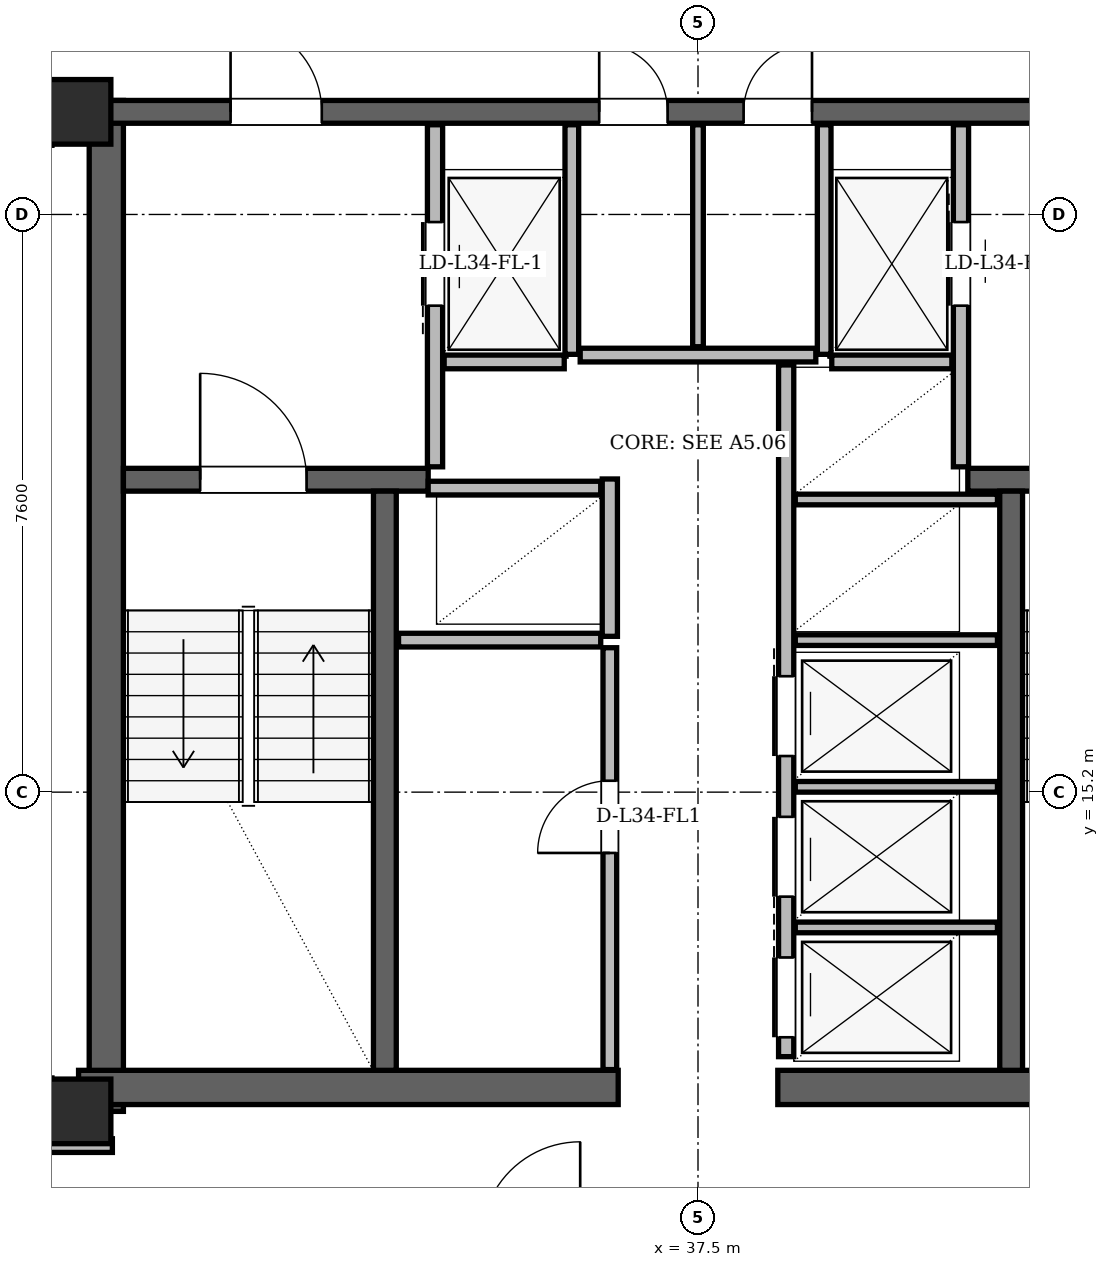
"""IFC4 building model, lengths in metres.
Left out: names, types, materials, properties, quantities, classifications, styles, units other than length and angle.
Written with IfcOpenShell. Run it as: python <this file> out.ifc"""

import sys

from ifc_helpers import new_model, si_unit, direction, frame, frame_2d, origin, origin_2d, place, context, subcontext, project, spatial, rectangle, hollow_rectangle, extrude, element, fill, save


model = new_model("IFC4")
c1 = context("Model", 3, precision=1e-05, world=origin(), true_north=direction((0.0, 1.0)))
c2 = subcontext(c1, "Body", "Model", "MODEL_VIEW")
j1 = project(units=[si_unit("LENGTHUNIT", "METRE"), si_unit("PLANEANGLEUNIT", "RADIAN")], contexts=[c1])
p1 = place(None, origin())
s1 = spatial("IfcSite", under=j1, at=p1, CompositionType="ELEMENT")
p2 = place(p1, origin())
s2 = spatial("IfcBuilding", under=s1, at=p2, CompositionType="ELEMENT")
p3 = place(p2, frame((0.0, 0.0, 130.2)))
s3 = spatial("IfcBuildingStorey", under=s2, at=p3, CompositionType="ELEMENT", Elevation=130.2)
for number, where, z_axis, x_axis in (
    (1, (29.35, 11.0, 0.0), (0.0, 0.0, 1.0), (1.0, 0.0, 0.0)),
    (2, (29.35, 24.15, 0.0), (0.0, 0.0, 1.0), (1.0, 0.0, 0.0)),
):
    element("IfcColumn", number, at=place(p3, frame(where, z_axis=z_axis, x_axis=x_axis)), inside=s3, PredefinedType="COLUMN", context=c2, shape_type="SweptSolid", body=[
        extrude(hollow_rectangle(XDim=0.85, YDim=0.85, WallThickness=0.07, at=origin_2d()), origin(), (0.0, 0.0, 1.0), 3.6),
    ])
p4 = place(p3, frame((29.715, 11.0, 0.0), z_axis=(0.0, 0.0, 1.0), x_axis=(0.0, 1.0, 0.0)))
e3 = element("IfcWall", 3, at=p4, inside=s3, PredefinedType="SHEAR", context=c2, shape_type="SweptSolid", body=[
    extrude(rectangle(XDim=13.3, YDim=0.45, at=frame_2d((6.65, 0.0))), origin(), (0.0, 0.0, 1.0), 3.34),
])
for number, where, z_axis, x_axis in (
    (4, (29.35, 11.315, 0.0), (0.0, 0.0, 1.0), (1.0, 0.0, 0.0)),
    (5, (38.55, 11.315, 0.0), (0.0, 0.0, 1.0), (1.0, 0.0, 0.0)),
):
    element("IfcWall", number, at=place(p3, frame(where, z_axis=z_axis, x_axis=x_axis)), inside=s3, PredefinedType="SHEAR", context=c2, shape_type="SweptSolid", body=[
        extrude(rectangle(XDim=7.1, YDim=0.45, at=frame_2d((3.55, 0.0))), origin(), (0.0, 0.0, 1.0), 3.34),
    ])
p5 = place(p3, frame((29.65, 24.15, 0.0), z_axis=(0.0, 0.0, 1.0), x_axis=(1.0, 0.0, 0.0)))
e6 = element("IfcWall", 6, at=p5, inside=s3, PredefinedType="SHEAR", context=c2, shape_type="SweptSolid", body=[
    extrude(rectangle(XDim=15.7, YDim=0.3, at=frame_2d((7.85, 0.0))), origin(), (0.0, 0.0, 1.0), 3.34),
])
p6 = place(p5, frame((1.7, 0.0, 0.0)))
e7 = element("IfcOpeningElement", 7, at=p6, cuts=e6, PredefinedType="OPENING", context=c2, shape_type="SweptSolid", body=[
    extrude(rectangle(XDim=1.2, YDim=2.2, at=frame_2d((0.6, 1.1))), frame((0.0, 0.15, 0.0), z_axis=(0.0, -1.0, 0.0), x_axis=(1.0, 0.0, 0.0)), (0.0, 0.0, 1.0), 0.3),
])
p7 = place(p5, frame((12.8, 0.0, 0.0)))
e8 = element("IfcOpeningElement", 8, at=p7, cuts=e6, PredefinedType="OPENING", context=c2, shape_type="SweptSolid", body=[
    extrude(rectangle(XDim=1.2, YDim=2.2, at=frame_2d((0.6, 1.1))), frame((0.0, 0.15, 0.0), z_axis=(0.0, -1.0, 0.0), x_axis=(1.0, 0.0, 0.0)), (0.0, 0.0, 1.0), 0.3),
])
p8 = place(p5, frame((6.55, 0.0, 0.0)))
e9 = element("IfcOpeningElement", 9, at=p8, cuts=e6, PredefinedType="OPENING", context=c2, shape_type="SweptSolid", body=[
    extrude(rectangle(XDim=0.9, YDim=2.05, at=frame_2d((0.45, 1.025))), frame((0.0, 0.15, 0.0), z_axis=(0.0, -1.0, 0.0), x_axis=(1.0, 0.0, 0.0)), (0.0, 0.0, 1.0), 0.3),
])
p9 = place(p5, frame((8.45, 0.0, 0.0)))
e10 = element("IfcOpeningElement", 10, at=p9, cuts=e6, PredefinedType="OPENING", context=c2, shape_type="SweptSolid", body=[
    extrude(rectangle(XDim=0.9, YDim=2.05, at=frame_2d((0.45, 1.025))), frame((0.0, 0.15, 0.0), z_axis=(0.0, -1.0, 0.0), x_axis=(1.0, 0.0, 0.0)), (0.0, 0.0, 1.0), 0.3),
])
p10 = place(p3, frame((29.94, 19.31, 0.0), z_axis=(0.0, 0.0, 1.0), x_axis=(1.0, 0.0, 0.0)))
e11 = element("IfcWall", 11, at=p10, inside=s3, PredefinedType="SHEAR", context=c2, shape_type="SweptSolid", body=[
    extrude(rectangle(XDim=4.01, YDim=0.3, at=frame_2d((2.005, 0.0))), origin(), (0.0, 0.0, 1.0), 3.34),
])
p11 = place(p10, frame((1.01, 0.0, 0.0)))
e12 = element("IfcOpeningElement", 12, at=p11, cuts=e11, PredefinedType="OPENING", context=c2, shape_type="SweptSolid", body=[
    extrude(rectangle(XDim=1.4, YDim=2.2, at=frame_2d((0.7, 1.1))), frame((0.0, 0.15, 0.0), z_axis=(0.0, -1.0, 0.0), x_axis=(1.0, 0.0, 0.0)), (0.0, 0.0, 1.0), 0.3),
])
p12 = place(p3, frame((41.05, 19.31, 0.0), z_axis=(0.0, 0.0, 1.0), x_axis=(1.0, 0.0, 0.0)))
e13 = element("IfcWall", 13, at=p12, inside=s3, PredefinedType="SHEAR", context=c2, shape_type="SweptSolid", body=[
    extrude(rectangle(XDim=4.01, YDim=0.3, at=frame_2d((2.005, 0.0))), origin(), (0.0, 0.0, 1.0), 3.34),
])
p13 = place(p12, frame((1.6, 0.0, 0.0)))
e14 = element("IfcOpeningElement", 14, at=p13, cuts=e13, PredefinedType="OPENING", context=c2, shape_type="SweptSolid", body=[
    extrude(rectangle(XDim=1.4, YDim=2.2, at=frame_2d((0.7, 1.1))), frame((0.0, 0.15, 0.0), z_axis=(0.0, -1.0, 0.0), x_axis=(1.0, 0.0, 0.0)), (0.0, 0.0, 1.0), 0.3),
])
for number, where, z_axis, x_axis in (
    (15, (33.38, 11.54, 0.0), (0.0, 0.0, 1.0), (0.0, 1.0, 0.0)),
    (16, (41.62, 11.54, 0.0), (0.0, 0.0, 1.0), (0.0, 1.0, 0.0)),
):
    element("IfcWall", number, at=place(p3, frame(where, z_axis=z_axis, x_axis=x_axis)), inside=s3, PredefinedType="SHEAR", context=c2, shape_type="SweptSolid", body=[
        extrude(rectangle(XDim=7.62, YDim=0.3, at=frame_2d((3.81, 0.0))), origin(), (0.0, 0.0, 1.0), 3.34),
    ])
p14 = place(p3, frame((32.303, 43.378, 0.0), z_axis=(0.0, 0.0, 1.0), x_axis=(-0.499999044439, -0.866025955477, 0.0)))
e17 = element("IfcWall", 17, at=p14, inside=s3, PredefinedType="SOLIDWALL", context=c2, shape_type="SweptSolid", body=[
    extrude(rectangle(XDim=35.122, YDim=0.34, at=frame_2d((17.561, 0.0))), origin(), (0.0, 0.0, 1.0), 2.558),
])
p15 = place(p14, frame((8.034, 0.0, 0.0)))
e18 = element("IfcOpeningElement", 18, at=p15, cuts=e17, PredefinedType="OPENING", context=c2, shape_type="SweptSolid", body=[
    extrude(rectangle(XDim=1.5, YDim=2.2, at=frame_2d((0.75, 1.1))), frame((0.0, 0.17, 0.0), z_axis=(0.0, -1.0, 0.0), x_axis=(1.0, 0.0, 0.0)), (0.0, 0.0, 1.0), 0.34),
])
p16 = place(p14, frame((26.832, 0.0, 0.0)))
e19 = element("IfcOpeningElement", 19, at=p16, cuts=e17, PredefinedType="OPENING", context=c2, shape_type="SweptSolid", body=[
    extrude(rectangle(XDim=1.5, YDim=2.2, at=frame_2d((0.75, 1.1))), frame((0.0, 0.17, 0.0), z_axis=(0.0, -1.0, 0.0), x_axis=(1.0, 0.0, 0.0)), (0.0, 0.0, 1.0), 0.34),
])
p17 = place(p14, frame((32.666, 0.0, 0.85)))
e20 = element("IfcOpeningElement", 20, at=p17, cuts=e17, PredefinedType="OPENING", context=c2, shape_type="SweptSolid", body=[
    extrude(rectangle(XDim=1.4, YDim=1.598, at=frame_2d((0.7, 0.799))), frame((0.0, 0.17, 0.0), z_axis=(0.0, -1.0, 0.0), x_axis=(1.0, 0.0, 0.0)), (0.0, 0.0, 1.0), 0.34),
])
p18 = place(p14, frame((22.593, 0.0, 0.85)))
e21 = element("IfcOpeningElement", 21, at=p18, cuts=e17, PredefinedType="OPENING", context=c2, shape_type="SweptSolid", body=[
    extrude(rectangle(XDim=1.2, YDim=1.48, at=frame_2d((0.6, 0.74))), frame((0.0, 0.17, 0.0), z_axis=(0.0, -1.0, 0.0), x_axis=(1.0, 0.0, 0.0)), (0.0, 0.0, 1.0), 0.34),
])
p19 = place(p14, frame((2.413, 0.0, 0.85)))
e22 = element("IfcOpeningElement", 22, at=p19, cuts=e17, PredefinedType="OPENING", context=c2, shape_type="SweptSolid", body=[
    extrude(rectangle(XDim=1.4, YDim=1.598, at=frame_2d((0.7, 0.799))), frame((0.0, 0.17, 0.0), z_axis=(0.0, -1.0, 0.0), x_axis=(1.0, 0.0, 0.0)), (0.0, 0.0, 1.0), 0.34),
])
p20 = place(p14, frame((13.476, 0.0, 0.85)))
e23 = element("IfcOpeningElement", 23, at=p20, cuts=e17, PredefinedType="OPENING", context=c2, shape_type="SweptSolid", body=[
    extrude(rectangle(XDim=2.5, YDim=1.598, at=frame_2d((1.25, 0.799))), frame((0.0, 0.17, 0.0), z_axis=(0.0, -1.0, 0.0), x_axis=(1.0, 0.0, 0.0)), (0.0, 0.0, 1.0), 0.34),
])
p21 = place(p14, frame((18.259, 0.0, 0.85)))
e24 = element("IfcOpeningElement", 24, at=p21, cuts=e17, PredefinedType="OPENING", context=c2, shape_type="SweptSolid", body=[
    extrude(rectangle(XDim=1.2, YDim=1.48, at=frame_2d((0.6, 0.74))), frame((0.0, 0.17, 0.0), z_axis=(0.0, -1.0, 0.0), x_axis=(1.0, 0.0, 0.0)), (0.0, 0.0, 1.0), 0.34),
])
p22 = place(p14, frame((20.455, 0.0, 0.85)))
e25 = element("IfcOpeningElement", 25, at=p22, cuts=e17, PredefinedType="OPENING", context=c2, shape_type="SweptSolid", body=[
    extrude(rectangle(XDim=1.2, YDim=1.48, at=frame_2d((0.6, 0.74))), frame((0.0, 0.17, 0.0), z_axis=(0.0, -1.0, 0.0), x_axis=(1.0, 0.0, 0.0)), (0.0, 0.0, 1.0), 0.34),
])
p23 = place(p3, frame((34.04, 19.48, 0.0), z_axis=(0.0, 0.0, 1.0), x_axis=(0.0, 1.0, 0.0)))
e26 = element("IfcWall", 26, at=p23, inside=s3, PredefinedType="PARTITIONING", context=c2, shape_type="SweptSolid", body=[
    extrude(rectangle(XDim=4.5, YDim=0.2, at=frame_2d((2.25, 0.0))), origin(), (0.0, 0.0, 1.0), 2.38),
])
p24 = place(p23, frame((2.12, 0.0, 0.0)))
e27 = element("IfcOpeningElement", 27, at=p24, cuts=e26, PredefinedType="OPENING", context=c2, shape_type="SweptSolid", body=[
    extrude(rectangle(XDim=1.1, YDim=2.2, at=frame_2d((0.55, 1.1))), frame((0.0, 0.1, 0.0), z_axis=(0.0, -1.0, 0.0), x_axis=(1.0, 0.0, 0.0)), (0.0, 0.0, 1.0), 0.2),
])
p25 = place(p3, frame((35.84, 20.96, 0.0), z_axis=(0.0, 0.0, 1.0), x_axis=(0.0, 1.0, 0.0)))
e28 = element("IfcWall", 28, at=p25, inside=s3, PredefinedType="PARTITIONING", context=c2, shape_type="SweptSolid", body=[
    extrude(rectangle(XDim=3.02, YDim=0.18, at=frame_2d((1.51, 0.0))), origin(), (0.0, 0.0, 1.0), 2.38),
])
p26 = place(p3, frame((34.16, 20.86, 0.0), z_axis=(0.0, 0.0, 1.0), x_axis=(1.0, 0.0, 0.0)))
e29 = element("IfcWall", 29, at=p26, inside=s3, PredefinedType="PARTITIONING", context=c2, shape_type="SweptSolid", body=[
    extrude(rectangle(XDim=1.58, YDim=0.18, at=frame_2d((0.79, 0.0))), origin(), (0.0, 0.0, 1.0), 3.34),
])
p27 = place(p3, frame((40.96, 19.48, 0.0), z_axis=(0.0, 0.0, 1.0), x_axis=(0.0, 1.0, 0.0)))
e30 = element("IfcWall", 30, at=p27, inside=s3, PredefinedType="PARTITIONING", context=c2, shape_type="SweptSolid", body=[
    extrude(rectangle(XDim=4.5, YDim=0.2, at=frame_2d((2.25, 0.0))), origin(), (0.0, 0.0, 1.0), 2.38),
])
p28 = place(p27, frame((2.12, 0.0, 0.0)))
e31 = element("IfcOpeningElement", 31, at=p28, cuts=e30, PredefinedType="OPENING", context=c2, shape_type="SweptSolid", body=[
    extrude(rectangle(XDim=1.1, YDim=2.2, at=frame_2d((0.55, 1.1))), frame((0.0, 0.1, 0.0), z_axis=(0.0, -1.0, 0.0), x_axis=(1.0, 0.0, 0.0)), (0.0, 0.0, 1.0), 0.2),
])
p29 = place(p3, frame((39.16, 20.96, 0.0), z_axis=(0.0, 0.0, 1.0), x_axis=(0.0, 1.0, 0.0)))
e32 = element("IfcWall", 32, at=p29, inside=s3, PredefinedType="PARTITIONING", context=c2, shape_type="SweptSolid", body=[
    extrude(rectangle(XDim=3.02, YDim=0.18, at=frame_2d((1.51, 0.0))), origin(), (0.0, 0.0, 1.0), 2.38),
])
p30 = place(p3, frame((39.26, 20.86, 0.0), z_axis=(0.0, 0.0, 1.0), x_axis=(1.0, 0.0, 0.0)))
e33 = element("IfcWall", 33, at=p30, inside=s3, PredefinedType="PARTITIONING", context=c2, shape_type="SweptSolid", body=[
    extrude(rectangle(XDim=1.58, YDim=0.18, at=frame_2d((0.79, 0.0))), origin(), (0.0, 0.0, 1.0), 3.34),
])
p31 = place(p3, frame((36.34, 17.25, 0.0), z_axis=(0.0, 0.0, 1.0), x_axis=(0.0, 1.0, 0.0)))
e34 = element("IfcWall", 34, at=p31, inside=s3, PredefinedType="PARTITIONING", context=c2, shape_type="SweptSolid", body=[
    extrude(rectangle(XDim=2.07, YDim=0.2, at=frame_2d((1.035, 0.0))), origin(), (0.0, 0.0, 1.0), 3.34),
])
p32 = place(p3, frame((33.95, 19.2, 0.0), z_axis=(0.0, 0.0, 1.0), x_axis=(1.0, 0.0, 0.0)))
e35 = element("IfcWall", 35, at=p32, inside=s3, PredefinedType="PARTITIONING", context=c2, shape_type="SweptSolid", body=[
    extrude(rectangle(XDim=2.27, YDim=0.18, at=frame_2d((1.135, 0.0))), origin(), (0.0, 0.0, 1.0), 3.34),
])
p33 = place(p3, frame((33.56, 17.2, 0.0), z_axis=(0.0, 0.0, 1.0), x_axis=(1.0, 0.0, 0.0)))
e36 = element("IfcWall", 36, at=p33, inside=s3, PredefinedType="PARTITIONING", context=c2, shape_type="SweptSolid", body=[
    extrude(rectangle(XDim=2.66, YDim=0.18, at=frame_2d((1.33, 0.0))), origin(), (0.0, 0.0, 1.0), 3.34),
])
p34 = place(p3, frame((36.34, 11.55, 0.0), z_axis=(0.0, 0.0, 1.0), x_axis=(0.0, 1.0, 0.0)))
e37 = element("IfcWall", 37, at=p34, inside=s3, PredefinedType="PARTITIONING", context=c2, shape_type="SweptSolid", body=[
    extrude(rectangle(XDim=5.55, YDim=0.18, at=frame_2d((2.775, 0.0))), origin(), (0.0, 0.0, 1.0), 3.34),
])
p35 = place(p34, frame((2.85, 0.0, 0.0)))
e38 = element("IfcOpeningElement", 38, at=p35, cuts=e37, PredefinedType="OPENING", context=c2, shape_type="SweptSolid", body=[
    extrude(rectangle(XDim=0.95, YDim=2.1, at=frame_2d((0.475, 1.05))), frame((0.0, 0.09, 0.0), z_axis=(0.0, -1.0, 0.0), x_axis=(1.0, 0.0, 0.0)), (0.0, 0.0, 1.0), 0.18),
])
p36 = place(p3, frame((38.66, 11.72, 0.0), z_axis=(0.0, 0.0, 1.0), x_axis=(0.0, 1.0, 0.0)))
e39 = element("IfcWall", 39, at=p36, inside=s3, PredefinedType="PARTITIONING", context=c2, shape_type="SweptSolid", body=[
    extrude(rectangle(XDim=9.1, YDim=0.2, at=frame_2d((4.55, 0.0))), origin(), (0.0, 0.0, 1.0), 3.34),
])
p37 = place(p36, frame((0.255, 0.0, 0.0)))
e40 = element("IfcOpeningElement", 40, at=p37, cuts=e39, PredefinedType="OPENING", context=c2, shape_type="SweptSolid", body=[
    extrude(rectangle(XDim=1.05, YDim=2.15, at=frame_2d((0.525, 1.075))), frame((0.0, 0.1, 0.0), z_axis=(0.0, -1.0, 0.0), x_axis=(1.0, 0.0, 0.0)), (0.0, 0.0, 1.0), 0.2),
])
p38 = place(p36, frame((2.105, 0.0, 0.0)))
e41 = element("IfcOpeningElement", 41, at=p38, cuts=e39, PredefinedType="OPENING", context=c2, shape_type="SweptSolid", body=[
    extrude(rectangle(XDim=1.05, YDim=2.15, at=frame_2d((0.525, 1.075))), frame((0.0, 0.1, 0.0), z_axis=(0.0, -1.0, 0.0), x_axis=(1.0, 0.0, 0.0)), (0.0, 0.0, 1.0), 0.2),
])
p39 = place(p36, frame((3.955, 0.0, 0.0)))
e42 = element("IfcOpeningElement", 42, at=p39, cuts=e39, PredefinedType="OPENING", context=c2, shape_type="SweptSolid", body=[
    extrude(rectangle(XDim=1.05, YDim=2.15, at=frame_2d((0.525, 1.075))), frame((0.0, 0.1, 0.0), z_axis=(0.0, -1.0, 0.0), x_axis=(1.0, 0.0, 0.0)), (0.0, 0.0, 1.0), 0.2),
])
for number, where, z_axis, x_axis in (
    (43, (38.78, 13.42, 0.0), (0.0, 0.0, 1.0), (1.0, 0.0, 0.0)),
    (44, (38.78, 15.27, 0.0), (0.0, 0.0, 1.0), (1.0, 0.0, 0.0)),
    (45, (38.78, 17.2, 0.0), (0.0, 0.0, 1.0), (1.0, 0.0, 0.0)),
    (46, (38.78, 19.05, 0.0), (0.0, 0.0, 1.0), (1.0, 0.0, 0.0)),
):
    element("IfcWall", number, at=place(p3, frame(where, z_axis=z_axis, x_axis=x_axis)), inside=s3, PredefinedType="PARTITIONING", context=c2, shape_type="SweptSolid", body=[
        extrude(rectangle(XDim=2.66, YDim=0.14, at=frame_2d((1.33, 0.0))), origin(), (0.0, 0.0, 1.0), 3.34),
    ])
p40 = place(p3, frame((35.95, 20.95, 0.0), z_axis=(0.0, 0.0, 1.0), x_axis=(1.0, 0.0, 0.0)))
e47 = element("IfcWall", 47, at=p40, inside=s3, PredefinedType="PARTITIONING", context=c2, shape_type="SweptSolid", body=[
    extrude(rectangle(XDim=3.1, YDim=0.18, at=frame_2d((1.55, 0.0))), origin(), (0.0, 0.0, 1.0), 3.34),
])
p41 = place(p3, frame((37.5, 21.06, 0.0), z_axis=(0.0, 0.0, 1.0), x_axis=(0.0, 1.0, 0.0)))
e48 = element("IfcWall", 48, at=p41, inside=s3, PredefinedType="PARTITIONING", context=c2, shape_type="SweptSolid", body=[
    extrude(rectangle(XDim=2.92, YDim=0.14, at=frame_2d((1.46, 0.0))), origin(), (0.0, 0.0, 1.0), 2.38),
])
p42 = place(p3, frame((28.905, 10.55, 0.0), z_axis=(0.0, 0.0, 1.0), x_axis=(1.0, 0.0, 0.0)))
e49 = element("IfcWall", 49, at=p42, inside=s3, PredefinedType="PARTITIONING", context=c2, shape_type="SweptSolid", body=[
    extrude(rectangle(XDim=0.89, YDim=0.18, at=frame_2d((0.445, 0.0))), origin(), (0.0, 0.0, 1.0), 3.34),
])
p43 = place(p35, origin())
e50 = element("IfcDoor", 50, at=p43, inside=s3, OperationType="SINGLE_SWING_LEFT", PredefinedType="DOOR", context=c2, shape_type="SweptSolid", body=[
    extrude(rectangle(XDim=0.95, YDim=2.1, at=frame_2d((0.475, 1.05))), frame((0.0, 0.025, 0.0), z_axis=(0.0, -1.0, 0.0), x_axis=(1.0, 0.0, 0.0)), (0.0, 0.0, 1.0), 0.05),
])
fill(e38, e50)
p44 = place(p24, origin())
e51 = element("IfcDoor", 51, at=p44, inside=s3, OperationType="SLIDING_TO_LEFT", PredefinedType="DOOR", context=c2, shape_type="SweptSolid", body=[
    extrude(rectangle(XDim=1.1, YDim=2.2, at=frame_2d((0.55, 1.1))), frame((0.0, 0.025, 0.0), z_axis=(0.0, -1.0, 0.0), x_axis=(1.0, 0.0, 0.0)), (0.0, 0.0, 1.0), 0.05),
])
fill(e27, e51)
p45 = place(p28, origin())
e52 = element("IfcDoor", 52, at=p45, inside=s3, OperationType="SLIDING_TO_RIGHT", PredefinedType="DOOR", context=c2, shape_type="SweptSolid", body=[
    extrude(rectangle(XDim=1.1, YDim=2.2, at=frame_2d((0.55, 1.1))), frame((0.0, 0.025, 0.0), z_axis=(0.0, -1.0, 0.0), x_axis=(1.0, 0.0, 0.0)), (0.0, 0.0, 1.0), 0.05),
])
fill(e31, e52)
p46 = place(p37, origin())
e53 = element("IfcDoor", 53, at=p46, inside=s3, OperationType="SLIDING_TO_RIGHT", PredefinedType="DOOR", context=c2, shape_type="SweptSolid", body=[
    extrude(rectangle(XDim=1.05, YDim=2.15, at=frame_2d((0.525, 1.075))), frame((0.0, 0.025, 0.0), z_axis=(0.0, -1.0, 0.0), x_axis=(1.0, 0.0, 0.0)), (0.0, 0.0, 1.0), 0.05),
])
fill(e40, e53)
p47 = place(p38, origin())
e54 = element("IfcDoor", 54, at=p47, inside=s3, OperationType="SLIDING_TO_LEFT", PredefinedType="DOOR", context=c2, shape_type="SweptSolid", body=[
    extrude(rectangle(XDim=1.05, YDim=2.15, at=frame_2d((0.525, 1.075))), frame((0.0, 0.025, 0.0), z_axis=(0.0, -1.0, 0.0), x_axis=(1.0, 0.0, 0.0)), (0.0, 0.0, 1.0), 0.05),
])
fill(e41, e54)
p48 = place(p39, origin())
e55 = element("IfcDoor", 55, at=p48, inside=s3, OperationType="SLIDING_TO_RIGHT", PredefinedType="DOOR", context=c2, shape_type="SweptSolid", body=[
    extrude(rectangle(XDim=1.05, YDim=2.15, at=frame_2d((0.525, 1.075))), frame((0.0, 0.025, 0.0), z_axis=(0.0, -1.0, 0.0), x_axis=(1.0, 0.0, 0.0)), (0.0, 0.0, 1.0), 0.05),
])
fill(e42, e55)
p49 = place(p11, origin())
e56 = element("IfcDoor", 56, at=p49, inside=s3, OperationType="SINGLE_SWING_LEFT", PredefinedType="DOOR", context=c2, shape_type="SweptSolid", body=[
    extrude(rectangle(XDim=1.4, YDim=2.2, at=frame_2d((0.7, 1.1))), frame((0.0, 0.025, 0.0), z_axis=(0.0, -1.0, 0.0), x_axis=(1.0, 0.0, 0.0)), (0.0, 0.0, 1.0), 0.05),
])
fill(e12, e56)
p50 = place(p6, origin())
e57 = element("IfcDoor", 57, at=p50, inside=s3, OperationType="SINGLE_SWING_LEFT", PredefinedType="DOOR", context=c2, shape_type="SweptSolid", body=[
    extrude(rectangle(XDim=1.2, YDim=2.2, at=frame_2d((0.6, 1.1))), frame((0.0, 0.025, 0.0), z_axis=(0.0, -1.0, 0.0), x_axis=(1.0, 0.0, 0.0)), (0.0, 0.0, 1.0), 0.05),
])
fill(e7, e57)
p51 = place(p8, origin())
e58 = element("IfcDoor", 58, at=p51, inside=s3, OperationType="SINGLE_SWING_LEFT", PredefinedType="DOOR", context=c2, shape_type="SweptSolid", body=[
    extrude(rectangle(XDim=0.9, YDim=2.05, at=frame_2d((0.45, 1.025))), frame((0.0, 0.025, 0.0), z_axis=(0.0, -1.0, 0.0), x_axis=(1.0, 0.0, 0.0)), (0.0, 0.0, 1.0), 0.05),
])
fill(e9, e58)
p52 = place(p9, origin())
e59 = element("IfcDoor", 59, at=p52, inside=s3, OperationType="SINGLE_SWING_RIGHT", PredefinedType="DOOR", context=c2, shape_type="SweptSolid", body=[
    extrude(rectangle(XDim=0.9, YDim=2.05, at=frame_2d((0.45, 1.025))), frame((0.0, 0.025, 0.0), z_axis=(0.0, -1.0, 0.0), x_axis=(1.0, 0.0, 0.0)), (0.0, 0.0, 1.0), 0.05),
])
fill(e10, e59)
save(model, sys.argv[1])
